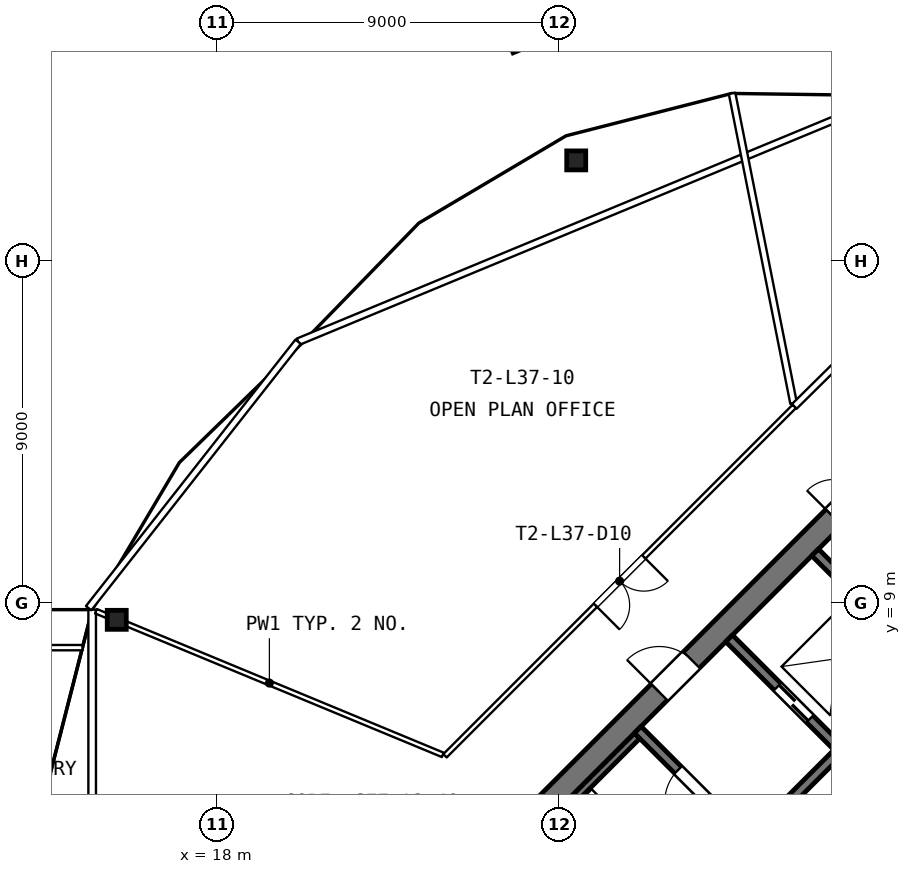
"""IFC4 building model, lengths in metres.
Left out: names, types, materials, properties, quantities, classifications, styles, units other than length and angle.
Written with IfcOpenShell. Run it as: python <this file> out.ifc"""

import sys

from ifc_helpers import new_model, si_unit, direction, frame, frame_2d, origin, origin_2d, place, context, subcontext, project, spatial, rectangle, hollow_rectangle, extrude, element, fill, save


model = new_model("IFC4")
c1 = context("Model", 3, precision=1e-05, world=origin(), true_north=direction((0.0, 1.0)))
c2 = subcontext(c1, "Body", "Model", "MODEL_VIEW")
j1 = project(units=[si_unit("LENGTHUNIT", "METRE"), si_unit("PLANEANGLEUNIT", "RADIAN")], contexts=[c1])
p1 = place(None, origin())
s1 = spatial("IfcSite", under=j1, at=p1, CompositionType="ELEMENT")
p2 = place(p1, origin())
s2 = spatial("IfcBuilding", under=s1, at=p2, CompositionType="ELEMENT")
p3 = place(p2, frame((0.0, 0.0, 130.8)))
s3 = spatial("IfcBuildingStorey", under=s2, at=p3, CompositionType="ELEMENT", Elevation=130.8)
p4 = place(p3, frame((25.821, 24.575, 0.0), z_axis=(0.007786476489, -0.018778670571, 0.999793344805), x_axis=(-0.707293788145, 0.706670185601, 0.018781534372)))
e1 = element("IfcColumn", 1, at=p4, inside=s3, PredefinedType="COLUMN", context=c2, shape_type="SweptSolid", body=[
    extrude(hollow_rectangle(XDim=0.9, YDim=0.9, WallThickness=0.08, at=origin_2d()), origin(), (0.0, 0.0, 1.0), 30.006),
])
p5 = place(p2, frame((0.0, 0.0, 156.8)))
s4 = spatial("IfcBuildingStorey", under=s2, at=p5, CompositionType="ELEMENT", Elevation=156.8)
for number, where, z_axis, x_axis in (
    (2, (27.451, 20.639, 0.0), (0.0, 0.0, 1.0), (1.0, 0.0, 0.0)),
    (3, (15.361, 8.549, 0.0), (0.0, 0.0, 1.0), (1.0, 0.0, 0.0)),
):
    element("IfcColumn", number, at=place(p5, frame(where, z_axis=z_axis, x_axis=x_axis)), inside=s4, PredefinedType="COLUMN", context=c2, shape_type="SweptSolid", body=[
        extrude(hollow_rectangle(XDim=0.5, YDim=0.5, WallThickness=0.03, at=origin_2d()), origin(), (0.0, 0.0, 1.0), 3.9),
    ])
p6 = place(p5, frame((30.944, -7.531, 0.0), z_axis=(0.0, 0.0, 1.0), x_axis=(0.707106781187, 0.707106781187, 0.0)))
e4 = element("IfcWall", 4, at=p6, inside=s4, PredefinedType="SHEAR", context=c2, shape_type="SweptSolid", body=[
    extrude(rectangle(XDim=17.8, YDim=0.4, at=frame_2d((8.9, 0.0))), origin(), (0.0, 0.0, 1.0), 3.7),
])
p7 = place(p6, frame((12.65, 0.0, 0.0)))
e5 = element("IfcOpeningElement", 5, at=p7, cuts=e4, PredefinedType="OPENING", context=c2, shape_type="SweptSolid", body=[
    extrude(rectangle(XDim=1.2, YDim=2.1, at=frame_2d((0.6, 1.05))), frame((0.0, 0.21, 0.0), z_axis=(0.0, -1.0, 0.0), x_axis=(1.0, 0.0, 0.0)), (0.0, 0.0, 1.0), 0.42),
])
p8 = place(p6, frame((15.65, 0.0, 0.0)))
e6 = element("IfcOpeningElement", 6, at=p8, cuts=e4, PredefinedType="OPENING", context=c2, shape_type="SweptSolid", body=[
    extrude(rectangle(XDim=1.1, YDim=2.1, at=frame_2d((0.55, 1.05))), frame((0.0, 0.21, 0.0), z_axis=(0.0, -1.0, 0.0), x_axis=(1.0, 0.0, 0.0)), (0.0, 0.0, 1.0), 0.42),
])
p9 = place(p6, frame((2.45, 0.0, 0.0)))
e7 = element("IfcOpeningElement", 7, at=p9, cuts=e4, PredefinedType="OPENING", context=c2, shape_type="SweptSolid", body=[
    extrude(rectangle(XDim=1.0, YDim=2.1, at=frame_2d((0.5, 1.05))), frame((0.0, 0.21, 0.0), z_axis=(0.0, -1.0, 0.0), x_axis=(1.0, 0.0, 0.0)), (0.0, 0.0, 1.0), 0.42),
])
p10 = place(p6, frame((8.4, 0.0, 0.0)))
e8 = element("IfcOpeningElement", 8, at=p10, cuts=e4, PredefinedType="OPENING", context=c2, shape_type="SweptSolid", body=[
    extrude(rectangle(XDim=1.0, YDim=2.1, at=frame_2d((0.5, 1.05))), frame((0.0, 0.21, 0.0), z_axis=(0.0, -1.0, 0.0), x_axis=(1.0, 0.0, 0.0)), (0.0, 0.0, 1.0), 0.42),
])
p11 = place(p5, frame((28.469, -5.056, 0.0), z_axis=(0.0, 0.0, 1.0), x_axis=(0.707106781187, 0.707106781187, 0.0)))
e9 = element("IfcWall", 9, at=p11, inside=s4, PredefinedType="SHEAR", context=c2, shape_type="SweptSolid", body=[
    extrude(rectangle(XDim=17.8, YDim=0.4, at=frame_2d((8.9, 0.0))), origin(), (0.0, 0.0, 1.0), 3.7),
])
p12 = place(p11, frame((0.4, 0.0, 0.0)))
e10 = element("IfcOpeningElement", 10, at=p12, cuts=e9, PredefinedType="OPENING", context=c2, shape_type="SweptSolid", body=[
    extrude(rectangle(XDim=1.0, YDim=2.1, at=frame_2d((0.5, 1.05))), frame((0.0, 0.21, 0.0), z_axis=(0.0, -1.0, 0.0), x_axis=(1.0, 0.0, 0.0)), (0.0, 0.0, 1.0), 0.42),
])
p13 = place(p11, frame((2.55, 0.0, 0.0)))
e11 = element("IfcOpeningElement", 11, at=p13, cuts=e9, PredefinedType="OPENING", context=c2, shape_type="SweptSolid", body=[
    extrude(rectangle(XDim=1.1, YDim=2.1, at=frame_2d((0.55, 1.05))), frame((0.0, 0.21, 0.0), z_axis=(0.0, -1.0, 0.0), x_axis=(1.0, 0.0, 0.0)), (0.0, 0.0, 1.0), 0.42),
])
p14 = place(p11, frame((5.45, 0.0, 0.0)))
e12 = element("IfcOpeningElement", 12, at=p14, cuts=e9, PredefinedType="OPENING", context=c2, shape_type="SweptSolid", body=[
    extrude(rectangle(XDim=1.1, YDim=2.1, at=frame_2d((0.55, 1.05))), frame((0.0, 0.21, 0.0), z_axis=(0.0, -1.0, 0.0), x_axis=(1.0, 0.0, 0.0)), (0.0, 0.0, 1.0), 0.42),
])
p15 = place(p11, frame((8.35, 0.0, 0.0)))
e13 = element("IfcOpeningElement", 13, at=p15, cuts=e9, PredefinedType="OPENING", context=c2, shape_type="SweptSolid", body=[
    extrude(rectangle(XDim=1.1, YDim=2.1, at=frame_2d((0.55, 1.05))), frame((0.0, 0.21, 0.0), z_axis=(0.0, -1.0, 0.0), x_axis=(1.0, 0.0, 0.0)), (0.0, 0.0, 1.0), 0.42),
])
p16 = place(p11, frame((11.25, 0.0, 0.0)))
e14 = element("IfcOpeningElement", 14, at=p16, cuts=e9, PredefinedType="OPENING", context=c2, shape_type="SweptSolid", body=[
    extrude(rectangle(XDim=1.1, YDim=2.1, at=frame_2d((0.55, 1.05))), frame((0.0, 0.21, 0.0), z_axis=(0.0, -1.0, 0.0), x_axis=(1.0, 0.0, 0.0)), (0.0, 0.0, 1.0), 0.42),
])
p17 = place(p11, frame((14.15, 0.0, 0.0)))
e15 = element("IfcOpeningElement", 15, at=p17, cuts=e9, PredefinedType="OPENING", context=c2, shape_type="SweptSolid", body=[
    extrude(rectangle(XDim=1.1, YDim=2.1, at=frame_2d((0.55, 1.05))), frame((0.0, 0.21, 0.0), z_axis=(0.0, -1.0, 0.0), x_axis=(1.0, 0.0, 0.0)), (0.0, 0.0, 1.0), 0.42),
])
p18 = place(p11, frame((16.4, 0.0, 0.0)))
e16 = element("IfcOpeningElement", 16, at=p18, cuts=e9, PredefinedType="OPENING", context=c2, shape_type="SweptSolid", body=[
    extrude(rectangle(XDim=1.0, YDim=2.1, at=frame_2d((0.5, 1.05))), frame((0.0, 0.21, 0.0), z_axis=(0.0, -1.0, 0.0), x_axis=(1.0, 0.0, 0.0)), (0.0, 0.0, 1.0), 0.42),
])
p19 = place(p5, frame((26.348, -2.935, 0.0), z_axis=(0.0, 0.0, 1.0), x_axis=(0.707106781187, 0.707106781187, 0.0)))
e17 = element("IfcWall", 17, at=p19, inside=s4, PredefinedType="SHEAR", context=c2, shape_type="SweptSolid", body=[
    extrude(rectangle(XDim=15.775, YDim=0.25, at=frame_2d((7.888, 0.0))), origin(), (0.0, 0.0, 1.0), 3.7),
])
p20 = place(p5, frame((23.625, 0.071, 0.0), z_axis=(0.0, 0.0, 1.0), x_axis=(0.707122685701, 0.707090876314, 0.0)))
e18 = element("IfcWall", 18, at=p20, inside=s4, PredefinedType="SHEAR", context=c2, shape_type="SweptSolid", body=[
    extrude(rectangle(XDim=7.675, YDim=0.2, at=frame_2d((3.837, 0.0))), origin(), (0.0, 0.0, 1.0), 3.7),
])
p21 = place(p5, frame((23.201, 0.212, 0.0), z_axis=(0.0, 0.0, 1.0), x_axis=(0.707106781187, 0.707106781187, 0.0)))
e19 = element("IfcWall", 19, at=p21, inside=s4, PredefinedType="SHEAR", context=c2, shape_type="SweptSolid", body=[
    extrude(rectangle(XDim=17.8, YDim=0.6, at=frame_2d((8.9, 0.0))), origin(), (0.0, 0.0, 1.0), 3.7),
])
p22 = place(p21, frame((9.1, 0.0, 0.0)))
e20 = element("IfcOpeningElement", 20, at=p22, cuts=e19, PredefinedType="OPENING", context=c2, shape_type="SweptSolid", body=[
    extrude(rectangle(XDim=1.2, YDim=2.1, at=frame_2d((0.6, 1.05))), frame((0.0, 0.31, 0.0), z_axis=(0.0, -1.0, 0.0), x_axis=(1.0, 0.0, 0.0)), (0.0, 0.0, 1.0), 0.62),
])
p23 = place(p21, frame((15.6, 0.0, 0.0)))
e21 = element("IfcOpeningElement", 21, at=p23, cuts=e19, PredefinedType="OPENING", context=c2, shape_type="SweptSolid", body=[
    extrude(rectangle(XDim=1.0, YDim=2.1, at=frame_2d((0.5, 1.05))), frame((0.0, 0.31, 0.0), z_axis=(0.0, -1.0, 0.0), x_axis=(1.0, 0.0, 0.0)), (0.0, 0.0, 1.0), 0.62),
])
p24 = place(p5, frame((31.917, 2.811, 0.0), z_axis=(0.0, 0.0, 1.0), x_axis=(-0.707106781187, 0.707106781187, 0.0)))
e22 = element("IfcWall", 22, at=p24, inside=s4, PredefinedType="SHEAR", context=c2, shape_type="SweptSolid", body=[
    extrude(rectangle(XDim=4.025, YDim=0.25, at=frame_2d((2.013, 0.0))), origin(), (0.0, 0.0, 1.0), 3.7),
])
p25 = place(p24, frame((1.325, 0.0, 0.0)))
e23 = element("IfcOpeningElement", 23, at=p25, cuts=e22, PredefinedType="OPENING", context=c2, shape_type="SweptSolid", body=[
    extrude(rectangle(XDim=1.2, YDim=2.1, at=frame_2d((0.6, 1.05))), frame((0.0, 0.135, 0.0), z_axis=(0.0, -1.0, 0.0), x_axis=(1.0, 0.0, 0.0)), (0.0, 0.0, 1.0), 0.27),
])
p26 = place(p5, frame((34.321, 5.215, 0.0), z_axis=(0.0, 0.0, 1.0), x_axis=(-0.70707645213, 0.707137108942, 0.0)))
e24 = element("IfcWall", 24, at=p26, inside=s4, PredefinedType="SHEAR", context=c2, shape_type="SweptSolid", body=[
    extrude(rectangle(XDim=4.025, YDim=0.25, at=frame_2d((2.012, 0.0))), origin(), (0.0, 0.0, 1.0), 3.7),
])
p27 = place(p26, frame((1.025, 0.0, 0.0)))
e25 = element("IfcOpeningElement", 25, at=p27, cuts=e24, PredefinedType="OPENING", context=c2, shape_type="SweptSolid", body=[
    extrude(rectangle(XDim=1.2, YDim=2.1, at=frame_2d((0.6, 1.05))), frame((0.0, 0.135, 0.0), z_axis=(0.0, -1.0, 0.0), x_axis=(1.0, 0.0, 0.0)), (0.0, 0.0, 1.0), 0.27),
])
p28 = place(p5, frame((36.583, 7.478, 0.0), z_axis=(0.0, 0.0, 1.0), x_axis=(-0.707137108942, 0.70707645213, 0.0)))
e26 = element("IfcWall", 26, at=p28, inside=s4, PredefinedType="SHEAR", context=c2, shape_type="SweptSolid", body=[
    extrude(rectangle(XDim=4.025, YDim=0.25, at=frame_2d((2.012, 0.0))), origin(), (0.0, 0.0, 1.0), 3.7),
])
p29 = place(p5, frame((31.552, 22.402, 0.0), z_axis=(0.0, 0.0, 1.0), x_axis=(0.19475453981, -0.980852011887, 0.0)))
e27 = element("IfcWall", 27, at=p29, inside=s4, PredefinedType="PARTITIONING", context=c2, shape_type="SweptSolid", body=[
    extrude(rectangle(XDim=8.311, YDim=0.175, at=frame_2d((4.156, 0.0))), origin(), (0.0, 0.0, 1.0), 2.2),
])
p30 = place(p5, frame((14.814, 8.776, 0.0), z_axis=(0.0, 0.0, 1.0), x_axis=(0.923880680571, -0.382680660691, 0.0)))
e28 = element("IfcWall", 28, at=p30, inside=s4, PredefinedType="PARTITIONING", context=c2, shape_type="SweptSolid", body=[
    extrude(rectangle(XDim=9.878, YDim=0.125, at=frame_2d((4.939, 0.0))), origin(), (0.0, 0.0, 1.0), 2.2),
])
p31 = place(p5, frame((36.0, 16.942, 0.0), z_axis=(0.0, 0.0, 1.0), x_axis=(-0.71141641015, -0.70277072461, 0.0)))
e29 = element("IfcWall", 29, at=p31, inside=s4, PredefinedType="PARTITIONING", context=c2, shape_type="SweptSolid", body=[
    extrude(rectangle(XDim=3.953, YDim=0.175, at=frame_2d((1.977, 0.0))), origin(), (0.0, 0.0, 1.0), 3.7),
])
p32 = place(p5, frame((33.188, 14.164, 0.0), z_axis=(0.0, 0.0, 1.0), x_axis=(-0.706994076888, -0.707219467524, 0.0)))
e30 = element("IfcWall", 30, at=p32, inside=s4, PredefinedType="PARTITIONING", context=c2, shape_type="SweptSolid", body=[
    extrude(rectangle(XDim=12.998, YDim=0.125, at=frame_2d((6.499, 0.0))), origin(), (0.0, 0.0, 1.0), 2.5),
])
p33 = place(p32, frame((5.599, 0.0, 0.0)))
e31 = element("IfcOpeningElement", 31, at=p33, cuts=e30, PredefinedType="OPENING", context=c2, shape_type="SweptSolid", body=[
    extrude(rectangle(XDim=1.8, YDim=2.1, at=frame_2d((0.9, 1.05))), frame((0.0, 0.073, 0.0), z_axis=(0.0, -1.0, 0.0), x_axis=(1.0, 0.0, 0.0)), (0.0, 0.0, 1.0), 0.145),
])
p34 = place(p5, frame((14.714, -8.817, 0.0), z_axis=(0.0, 0.0, 1.0), x_axis=(0.0, 1.0, 0.0)))
e32 = element("IfcWall", 32, at=p34, inside=s4, PredefinedType="PARTITIONING", context=c2, shape_type="SweptSolid", body=[
    extrude(rectangle(XDim=17.634, YDim=0.2, at=frame_2d((8.817, 0.0))), origin(), (0.0, 0.0, 1.0), 3.7),
])
p35 = place(p34, frame((10.167, 0.0, 0.0)))
e33 = element("IfcOpeningElement", 33, at=p35, cuts=e32, PredefinedType="OPENING", context=c2, shape_type="SweptSolid", body=[
    extrude(rectangle(XDim=1.8, YDim=2.1, at=frame_2d((0.9, 1.05))), frame((0.0, 0.11, 0.0), z_axis=(0.0, -1.0, 0.0), x_axis=(1.0, 0.0, 0.0)), (0.0, 0.0, 1.0), 0.22),
])
p36 = place(p27, origin())
e34 = element("IfcDoor", 34, at=p36, inside=s4, OperationType="SLIDING_TO_LEFT", PredefinedType="DOOR", context=c2, shape_type="SweptSolid", body=[
    extrude(rectangle(XDim=1.2, YDim=2.1, at=frame_2d((0.6, 1.05))), frame((0.0, 0.025, 0.0), z_axis=(0.0, -1.0, 0.0), x_axis=(1.0, 0.0, 0.0)), (0.0, 0.0, 1.0), 0.05),
])
fill(e25, e34)
p37 = place(p25, origin())
e35 = element("IfcDoor", 35, at=p37, inside=s4, OperationType="SINGLE_SWING_LEFT", PredefinedType="DOOR", context=c2, shape_type="SweptSolid", body=[
    extrude(rectangle(XDim=1.2, YDim=2.1, at=frame_2d((0.6, 1.05))), frame((0.0, 0.025, 0.0), z_axis=(0.0, -1.0, 0.0), x_axis=(1.0, 0.0, 0.0)), (0.0, 0.0, 1.0), 0.05),
])
fill(e23, e35)
p38 = place(p22, origin())
e36 = element("IfcDoor", 36, at=p38, inside=s4, OperationType="SINGLE_SWING_LEFT", PredefinedType="DOOR", context=c2, shape_type="SweptSolid", body=[
    extrude(rectangle(XDim=1.2, YDim=2.1, at=frame_2d((0.6, 1.05))), frame((0.0, -0.125, 0.0), z_axis=(0.0, -1.0, 0.0), x_axis=(1.0, 0.0, 0.0)), (0.0, 0.0, 1.0), 0.05),
])
fill(e20, e36)
p39 = place(p33, origin())
e37 = element("IfcDoor", 37, at=p39, inside=s4, OperationType="DOUBLE_DOOR_DOUBLE_SWING", PredefinedType="DOOR", context=c2, shape_type="SweptSolid", body=[
    extrude(rectangle(XDim=1.8, YDim=2.1, at=frame_2d((0.9, 1.05))), frame((0.0, 0.025, 0.0), z_axis=(0.0, -1.0, 0.0), x_axis=(1.0, 0.0, 0.0)), (0.0, 0.0, 1.0), 0.05),
])
fill(e31, e37)
save(model, sys.argv[1])
